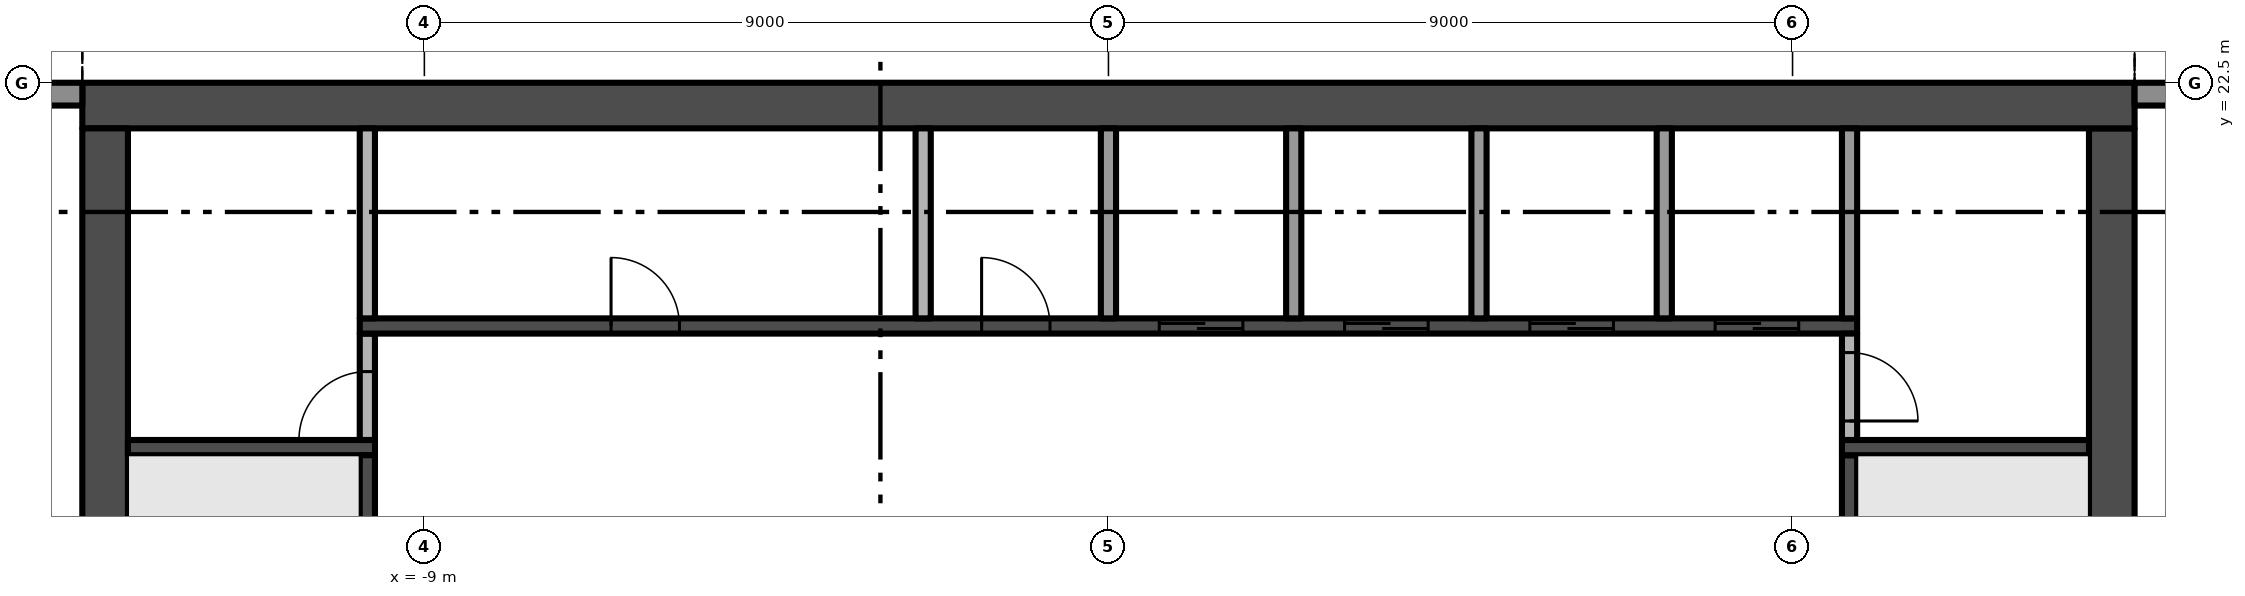
"""IFC4 building model, lengths in metres.
Left out: names, types, materials, properties, quantities, classifications, styles, units other than length and angle.
Written with IfcOpenShell. Run it as: python <this file> out.ifc"""

import sys

from ifc_helpers import new_model, si_unit, direction, frame, frame_2d, origin, place, context, subcontext, project, spatial, polyline, rectangle, outline, extrude, element, fill, save


model = new_model("IFC4")
c1 = context("Model", 3, precision=1e-05, world=origin(), true_north=direction((0.0, 1.0)))
c2 = subcontext(c1, "Body", "Model", "MODEL_VIEW")
j1 = project(units=[si_unit("LENGTHUNIT", "METRE"), si_unit("PLANEANGLEUNIT", "RADIAN")], contexts=[c1])
p1 = place(None, origin())
s1 = spatial("IfcSite", under=j1, at=p1, CompositionType="ELEMENT")
p2 = place(p1, origin())
s2 = spatial("IfcBuilding", under=s1, at=p2, CompositionType="ELEMENT")
p3 = place(p2, frame((0.0, 0.0, 276.8)))
s3 = spatial("IfcBuildingStorey", under=s2, at=p3, CompositionType="ELEMENT", Elevation=276.8)
p4 = place(p3, frame((13.2, 5.1, -0.3), z_axis=(0.0, 0.0, 1.0), x_axis=(0.0, 1.0, 0.0)))
e1 = element("IfcWall", 1, at=p4, inside=s3, PredefinedType="SHEAR", context=c2, shape_type="SweptSolid", body=[
    extrude(rectangle(XDim=16.8, YDim=0.6, at=frame_2d((8.4, 0.0))), origin(), (0.0, 0.0, 1.0), 3.8),
])
p5 = place(p4, frame((6.3, 0.0, 0.3)))
e2 = element("IfcOpeningElement", 2, at=p5, cuts=e1, PredefinedType="OPENING", context=c2, shape_type="SweptSolid", body=[
    extrude(rectangle(XDim=1.2, YDim=2.2, at=frame_2d((0.6, 1.1))), frame((0.0, 0.31, 0.0), z_axis=(0.0, -1.0, 0.0), x_axis=(1.0, 0.0, 0.0)), (0.0, 0.0, 1.0), 0.62),
])
p6 = place(p3, frame((13.5, 22.2, -0.3), z_axis=(0.0, 0.0, 1.0), x_axis=(-1.0, 0.0, 0.0)))
e3 = element("IfcWall", 3, at=p6, inside=s3, PredefinedType="SHEAR", context=c2, shape_type="SweptSolid", body=[
    extrude(rectangle(XDim=27.0, YDim=0.6, at=frame_2d((13.5, 0.0))), origin(), (0.0, 0.0, 1.0), 3.8),
])
p7 = place(p3, frame((-13.2, 21.9, -0.3), z_axis=(0.0, 0.0, 1.0), x_axis=(0.0, -1.0, 0.0)))
e4 = element("IfcWall", 4, at=p7, inside=s3, PredefinedType="SHEAR", context=c2, shape_type="SweptSolid", body=[
    extrude(rectangle(XDim=16.8, YDim=0.6, at=frame_2d((8.4, 0.0))), origin(), (0.0, 0.0, 1.0), 3.8),
])
p8 = place(p7, frame((9.3, 0.0, 0.3)))
e5 = element("IfcOpeningElement", 5, at=p8, cuts=e4, PredefinedType="OPENING", context=c2, shape_type="SweptSolid", body=[
    extrude(rectangle(XDim=1.2, YDim=2.2, at=frame_2d((0.6, 1.1))), frame((0.0, 0.31, 0.0), z_axis=(0.0, -1.0, 0.0), x_axis=(1.0, 0.0, 0.0)), (0.0, 0.0, 1.0), 0.62),
])
p9 = place(p3, frame((13.5, 22.35, 0.0), z_axis=(0.0, 0.0, 1.0), x_axis=(1.0, 0.0, 0.0)))
e6 = element("IfcWall", 6, at=p9, inside=s3, PredefinedType="SOLIDWALL", context=c2, shape_type="SweptSolid", body=[
    extrude(rectangle(XDim=4.05, YDim=0.3, at=frame_2d((2.025, 0.0))), origin(), (0.0, 0.0, 1.0), 3.5),
])
p10 = place(p9, frame((0.55, 0.0, 0.45)))
e7 = element("IfcOpeningElement", 7, at=p10, cuts=e6, PredefinedType="OPENING", context=c2, shape_type="SweptSolid", body=[
    extrude(rectangle(XDim=3.2, YDim=2.65, at=frame_2d((1.6, 1.325))), frame((0.0, 0.16, 0.0), z_axis=(0.0, -1.0, 0.0), x_axis=(1.0, 0.0, 0.0)), (0.0, 0.0, 1.0), 0.32),
])
p11 = place(p3, frame((-17.55, 22.35, 0.0), z_axis=(0.0, 0.0, 1.0), x_axis=(1.0, 0.0, 0.0)))
e8 = element("IfcWall", 8, at=p11, inside=s3, PredefinedType="SOLIDWALL", context=c2, shape_type="SweptSolid", body=[
    extrude(rectangle(XDim=4.05, YDim=0.3, at=frame_2d((2.025, 0.0))), origin(), (0.0, 0.0, 1.0), 3.5),
])
p12 = place(p11, frame((0.3, 0.0, 0.0)))
e9 = element("IfcOpeningElement", 9, at=p12, cuts=e8, PredefinedType="OPENING", context=c2, shape_type="SweptSolid", body=[
    extrude(rectangle(XDim=3.2, YDim=2.4, at=frame_2d((1.6, 1.2))), frame((0.0, 0.16, 0.0), z_axis=(0.0, -1.0, 0.0), x_axis=(1.0, 0.0, 0.0)), (0.0, 0.0, 1.0), 0.32),
])
p13 = place(p3, origin())
e10 = element("IfcWall", 10, at=p13, inside=s3, PredefinedType="USERDEFINED", context=c2, shape_type="SweptSolid", body=[
    extrude(outline(polyline([(22.5, 25.149), (21.0, 25.485), (20.625, 25.5), (19.5, 25.369), (18.0, 24.845), (16.5, 24.112), (15.0, 23.451), (13.5, 23.115), (13.555, 22.871), (15.079, 23.213), (16.605, 23.885), (18.096, 24.614), (19.556, 25.124), (20.635, 25.249), (20.967, 25.236), (22.445, 24.905), (22.5, 25.149)])), origin(), (0.0, 0.0, 1.0), 0.9),
])
p14 = place(p3, origin())
e11 = element("IfcWall", 11, at=p14, inside=s3, PredefinedType="USERDEFINED", context=c2, shape_type="SweptSolid", body=[
    extrude(outline(polyline([(-13.5, 25.149), (-15.0, 25.485), (-15.375, 25.5), (-16.5, 25.369), (-18.0, 24.845), (-19.5, 24.112), (-21.0, 23.451), (-22.5, 23.115), (-22.445, 22.871), (-20.921, 23.213), (-19.395, 23.885), (-17.904, 24.614), (-16.444, 25.124), (-15.365, 25.249), (-15.033, 25.236), (-13.555, 24.905), (-13.5, 25.149)])), origin(), (0.0, 0.0, 1.0), 0.9),
])
p15 = place(p3, frame((-12.9, 17.7, 0.0), z_axis=(0.0, 0.0, 1.0), x_axis=(1.0, 0.0, 0.0)))
e12 = element("IfcWall", 12, at=p15, inside=s3, PredefinedType="SHEAR", context=c2, shape_type="SweptSolid", body=[
    extrude(rectangle(XDim=3.25, YDim=0.2, at=frame_2d((1.625, 0.0))), origin(), (0.0, 0.0, 1.0), 3.5),
])
p16 = place(p3, frame((-9.75, 16.1, 0.0), z_axis=(0.0, 0.0, 1.0), x_axis=(0.0, 1.0, 0.0)))
e13 = element("IfcWall", 13, at=p16, inside=s3, PredefinedType="SHEAR", context=c2, shape_type="SweptSolid", body=[
    extrude(rectangle(XDim=1.5, YDim=0.2, at=frame_2d((0.75, 0.0))), origin(), (0.0, 0.0, 1.0), 3.5),
])
p17 = place(p3, frame((-9.75, 17.8, 0.0), z_axis=(0.0, 0.0, 1.0), x_axis=(0.0, 1.0, 0.0)))
e14 = element("IfcWall", 14, at=p17, inside=s3, PredefinedType="PARTITIONING", context=c2, shape_type="SweptSolid", body=[
    extrude(rectangle(XDim=1.4, YDim=0.2, at=frame_2d((0.7, 0.0))), origin(), (0.0, 0.0, 1.0), 3.5),
])
p18 = place(p17, origin())
e15 = element("IfcOpeningElement", 15, at=p18, cuts=e14, PredefinedType="OPENING", context=c2, shape_type="SweptSolid", body=[
    extrude(rectangle(XDim=0.9, YDim=2.1, at=frame_2d((0.45, 1.05))), frame((0.0, 0.11, 0.0), z_axis=(0.0, -1.0, 0.0), x_axis=(1.0, 0.0, 0.0)), (0.0, 0.0, 1.0), 0.22),
])
p19 = place(p3, frame((-9.85, 19.3, 0.0), z_axis=(0.0, 0.0, 1.0), x_axis=(1.0, 0.0, 0.0)))
e16 = element("IfcWall", 16, at=p19, inside=s3, PredefinedType="SHEAR", context=c2, shape_type="SweptSolid", body=[
    extrude(rectangle(XDim=19.7, YDim=0.2, at=frame_2d((9.85, 0.0))), origin(), (0.0, 0.0, 1.0), 3.5),
])
p20 = place(p19, frame((10.519, 0.0, 0.0)))
e17 = element("IfcOpeningElement", 17, at=p20, cuts=e16, PredefinedType="OPENING", context=c2, shape_type="SweptSolid", body=[
    extrude(rectangle(XDim=1.1, YDim=2.1, at=frame_2d((0.55, 1.05))), frame((0.0, 0.11, 0.0), z_axis=(0.0, -1.0, 0.0), x_axis=(1.0, 0.0, 0.0)), (0.0, 0.0, 1.0), 0.22),
])
p21 = place(p19, frame((12.956, 0.0, 0.0)))
e18 = element("IfcOpeningElement", 18, at=p21, cuts=e16, PredefinedType="OPENING", context=c2, shape_type="SweptSolid", body=[
    extrude(rectangle(XDim=1.1, YDim=2.1, at=frame_2d((0.55, 1.05))), frame((0.0, 0.11, 0.0), z_axis=(0.0, -1.0, 0.0), x_axis=(1.0, 0.0, 0.0)), (0.0, 0.0, 1.0), 0.22),
])
p22 = place(p19, frame((15.394, 0.0, 0.0)))
e19 = element("IfcOpeningElement", 19, at=p22, cuts=e16, PredefinedType="OPENING", context=c2, shape_type="SweptSolid", body=[
    extrude(rectangle(XDim=1.1, YDim=2.1, at=frame_2d((0.55, 1.05))), frame((0.0, 0.11, 0.0), z_axis=(0.0, -1.0, 0.0), x_axis=(1.0, 0.0, 0.0)), (0.0, 0.0, 1.0), 0.22),
])
p23 = place(p19, frame((17.831, 0.0, 0.0)))
e20 = element("IfcOpeningElement", 20, at=p23, cuts=e16, PredefinedType="OPENING", context=c2, shape_type="SweptSolid", body=[
    extrude(rectangle(XDim=1.1, YDim=2.1, at=frame_2d((0.55, 1.05))), frame((0.0, 0.11, 0.0), z_axis=(0.0, -1.0, 0.0), x_axis=(1.0, 0.0, 0.0)), (0.0, 0.0, 1.0), 0.22),
])
p24 = place(p19, frame((3.306, 0.0, 0.0)))
e21 = element("IfcOpeningElement", 21, at=p24, cuts=e16, PredefinedType="OPENING", context=c2, shape_type="SweptSolid", body=[
    extrude(rectangle(XDim=0.9, YDim=2.1, at=frame_2d((0.45, 1.05))), frame((0.0, 0.11, 0.0), z_axis=(0.0, -1.0, 0.0), x_axis=(1.0, 0.0, 0.0)), (0.0, 0.0, 1.0), 0.22),
])
p25 = place(p19, frame((8.181, 0.0, 0.0)))
e22 = element("IfcOpeningElement", 22, at=p25, cuts=e16, PredefinedType="OPENING", context=c2, shape_type="SweptSolid", body=[
    extrude(rectangle(XDim=0.9, YDim=2.1, at=frame_2d((0.45, 1.05))), frame((0.0, 0.11, 0.0), z_axis=(0.0, -1.0, 0.0), x_axis=(1.0, 0.0, 0.0)), (0.0, 0.0, 1.0), 0.22),
])
for number, where, z_axis, x_axis in (
    (23, (-9.75, 19.4, 0.0), (0.0, 0.0, 1.0), (0.0, 1.0, 0.0)),
    (24, (-2.438, 19.4, 0.0), (0.0, 0.0, 1.0), (0.0, 1.0, 0.0)),
    (25, (0.0, 19.4, 0.0), (0.0, 0.0, 1.0), (0.0, 1.0, 0.0)),
    (26, (2.438, 19.4, 0.0), (0.0, 0.0, 1.0), (0.0, 1.0, 0.0)),
    (27, (4.875, 19.4, 0.0), (0.0, 0.0, 1.0), (0.0, 1.0, 0.0)),
    (28, (7.312, 19.4, 0.0), (0.0, 0.0, 1.0), (0.0, 1.0, 0.0)),
):
    element("IfcWall", number, at=place(p3, frame(where, z_axis=z_axis, x_axis=x_axis)), inside=s3, PredefinedType="PARTITIONING", context=c2, shape_type="SweptSolid", body=[
        extrude(rectangle(XDim=2.5, YDim=0.2, at=frame_2d((1.25, 0.0))), origin(), (0.0, 0.0, 1.0), 3.5),
    ])
p26 = place(p3, frame((9.75, 16.1, 0.0), z_axis=(0.0, 0.0, 1.0), x_axis=(0.0, 1.0, 0.0)))
e29 = element("IfcWall", 29, at=p26, inside=s3, PredefinedType="SHEAR", context=c2, shape_type="SweptSolid", body=[
    extrude(rectangle(XDim=1.5, YDim=0.2, at=frame_2d((0.75, 0.0))), origin(), (0.0, 0.0, 1.0), 3.5),
])
p27 = place(p3, frame((9.65, 17.7, 0.0), z_axis=(0.0, 0.0, 1.0), x_axis=(1.0, 0.0, 0.0)))
e30 = element("IfcWall", 30, at=p27, inside=s3, PredefinedType="SHEAR", context=c2, shape_type="SweptSolid", body=[
    extrude(rectangle(XDim=3.25, YDim=0.2, at=frame_2d((1.625, 0.0))), origin(), (0.0, 0.0, 1.0), 3.5),
])
p28 = place(p3, frame((9.75, 19.2, 0.0), z_axis=(0.0, 0.0, 1.0), x_axis=(0.0, -1.0, 0.0)))
e31 = element("IfcWall", 31, at=p28, inside=s3, PredefinedType="PARTITIONING", context=c2, shape_type="SweptSolid", body=[
    extrude(rectangle(XDim=1.4, YDim=0.2, at=frame_2d((0.7, 0.0))), origin(), (0.0, 0.0, 1.0), 3.5),
])
p29 = place(p28, frame((0.25, 0.0, 0.0)))
e32 = element("IfcOpeningElement", 32, at=p29, cuts=e31, PredefinedType="OPENING", context=c2, shape_type="SweptSolid", body=[
    extrude(rectangle(XDim=0.9, YDim=2.1, at=frame_2d((0.45, 1.05))), frame((0.0, 0.11, 0.0), z_axis=(0.0, -1.0, 0.0), x_axis=(1.0, 0.0, 0.0)), (0.0, 0.0, 1.0), 0.22),
])
p30 = place(p3, frame((9.75, 19.4, 0.0), z_axis=(0.0, 0.0, 1.0), x_axis=(0.0, 1.0, 0.0)))
e33 = element("IfcWall", 33, at=p30, inside=s3, PredefinedType="PARTITIONING", context=c2, shape_type="SweptSolid", body=[
    extrude(rectangle(XDim=2.5, YDim=0.2, at=frame_2d((1.25, 0.0))), origin(), (0.0, 0.0, 1.0), 3.5),
])
p31 = place(p20, origin())
e34 = element("IfcDoor", 34, at=p31, inside=s3, OperationType="SLIDING_TO_RIGHT", PredefinedType="DOOR", context=c2, shape_type="SweptSolid", body=[
    extrude(rectangle(XDim=1.1, YDim=2.1, at=frame_2d((0.55, 1.05))), frame((0.0, 0.025, 0.0), z_axis=(0.0, -1.0, 0.0), x_axis=(1.0, 0.0, 0.0)), (0.0, 0.0, 1.0), 0.05),
])
fill(e17, e34)
p32 = place(p21, origin())
e35 = element("IfcDoor", 35, at=p32, inside=s3, OperationType="SLIDING_TO_RIGHT", PredefinedType="DOOR", context=c2, shape_type="SweptSolid", body=[
    extrude(rectangle(XDim=1.1, YDim=2.1, at=frame_2d((0.55, 1.05))), frame((0.0, 0.025, 0.0), z_axis=(0.0, -1.0, 0.0), x_axis=(1.0, 0.0, 0.0)), (0.0, 0.0, 1.0), 0.05),
])
fill(e18, e35)
p33 = place(p22, origin())
e36 = element("IfcDoor", 36, at=p33, inside=s3, OperationType="SLIDING_TO_RIGHT", PredefinedType="DOOR", context=c2, shape_type="SweptSolid", body=[
    extrude(rectangle(XDim=1.1, YDim=2.1, at=frame_2d((0.55, 1.05))), frame((0.0, 0.025, 0.0), z_axis=(0.0, -1.0, 0.0), x_axis=(1.0, 0.0, 0.0)), (0.0, 0.0, 1.0), 0.05),
])
fill(e19, e36)
p34 = place(p23, origin())
e37 = element("IfcDoor", 37, at=p34, inside=s3, OperationType="SLIDING_TO_RIGHT", PredefinedType="DOOR", context=c2, shape_type="SweptSolid", body=[
    extrude(rectangle(XDim=1.1, YDim=2.1, at=frame_2d((0.55, 1.05))), frame((0.0, 0.025, 0.0), z_axis=(0.0, -1.0, 0.0), x_axis=(1.0, 0.0, 0.0)), (0.0, 0.0, 1.0), 0.05),
])
fill(e20, e37)
p35 = place(p18, origin())
e38 = element("IfcDoor", 38, at=p35, inside=s3, OperationType="SINGLE_SWING_LEFT", PredefinedType="DOOR", context=c2, shape_type="SweptSolid", body=[
    extrude(rectangle(XDim=0.9, YDim=2.1, at=frame_2d((0.45, 1.05))), frame((0.0, 0.025, 0.0), z_axis=(0.0, -1.0, 0.0), x_axis=(1.0, 0.0, 0.0)), (0.0, 0.0, 1.0), 0.05),
])
fill(e15, e38)
p36 = place(p29, origin())
e39 = element("IfcDoor", 39, at=p36, inside=s3, OperationType="SINGLE_SWING_RIGHT", PredefinedType="DOOR", context=c2, shape_type="SweptSolid", body=[
    extrude(rectangle(XDim=0.9, YDim=2.1, at=frame_2d((0.45, 1.05))), frame((0.0, 0.025, 0.0), z_axis=(0.0, -1.0, 0.0), x_axis=(1.0, 0.0, 0.0)), (0.0, 0.0, 1.0), 0.05),
])
fill(e32, e39)
p37 = place(p24, origin())
e40 = element("IfcDoor", 40, at=p37, inside=s3, OperationType="SINGLE_SWING_LEFT", PredefinedType="DOOR", context=c2, shape_type="SweptSolid", body=[
    extrude(rectangle(XDim=0.9, YDim=2.1, at=frame_2d((0.45, 1.05))), frame((0.0, 0.025, 0.0), z_axis=(0.0, -1.0, 0.0), x_axis=(1.0, 0.0, 0.0)), (0.0, 0.0, 1.0), 0.05),
])
fill(e21, e40)
p38 = place(p25, origin())
e41 = element("IfcDoor", 41, at=p38, inside=s3, OperationType="SINGLE_SWING_LEFT", PredefinedType="DOOR", context=c2, shape_type="SweptSolid", body=[
    extrude(rectangle(XDim=0.9, YDim=2.1, at=frame_2d((0.45, 1.05))), frame((0.0, 0.025, 0.0), z_axis=(0.0, -1.0, 0.0), x_axis=(1.0, 0.0, 0.0)), (0.0, 0.0, 1.0), 0.05),
])
fill(e22, e41)
save(model, sys.argv[1])
